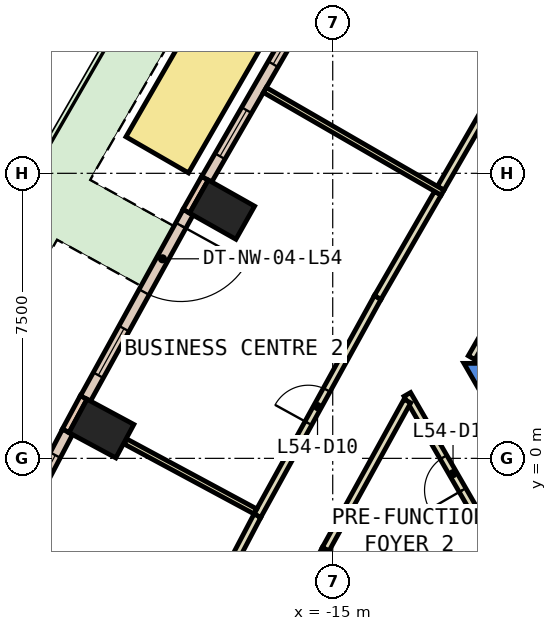
"""IFC4 building model, lengths in metres.
Left out: names, types, materials, properties, quantities, classifications, styles, units other than length and angle.
Written with IfcOpenShell. Run it as: python <this file> out.ifc"""

import sys

from ifc_helpers import new_model, si_unit, direction, frame, frame_2d, origin, origin_2d, place, context, subcontext, project, spatial, polyline, rectangle, outline, extrude, element, fill, save


model = new_model("IFC4")
c1 = context("Model", 3, precision=1e-05, world=origin(), true_north=direction((0.0, 1.0)))
c2 = subcontext(c1, "Body", "Model", "MODEL_VIEW")
j1 = project(units=[si_unit("LENGTHUNIT", "METRE"), si_unit("PLANEANGLEUNIT", "RADIAN")], contexts=[c1])
p1 = place(None, origin())
s1 = spatial("IfcSite", under=j1, at=p1, CompositionType="ELEMENT")
p2 = place(p1, origin())
s2 = spatial("IfcBuilding", under=s1, at=p2, CompositionType="ELEMENT")
p3 = place(p2, frame((0.0, 0.0, 241.4)))
s3 = spatial("IfcBuildingStorey", under=s2, at=p3, CompositionType="ELEMENT", Elevation=241.4)
for number, where, z_axis, x_axis in (
    (1, (-17.911, 6.544, 0.0), (0.0, 0.0, 1.0), (0.491, 0.871, 0.0)),
    (2, (-21.086, 0.784, 0.0), (0.0, 0.0, 1.0), (0.474, 0.881, 0.0)),
):
    element("IfcColumn", number, at=place(p3, frame(where, z_axis=z_axis, x_axis=x_axis)), inside=s3, PredefinedType="COLUMN", context=c2, shape_type="SweptSolid", body=[
        extrude(rectangle(XDim=1.0, YDim=1.4, at=origin_2d()), origin(), (0.0, 0.0, 1.0), 3.26),
    ])
p4 = place(p3, frame((0.0, 0.0, -0.6)))
e3 = element("IfcWall", 3, at=p4, inside=s3, PredefinedType="SHEAR", context=c2, shape_type="SweptSolid", body=[
    extrude(outline(polyline([(-11.547, 2.5), (-5.774, -7.5), (-5.427, -6.9), (-10.854, 2.5), (-11.547, 2.5)])), origin(), (0.0, 0.0, 1.0), 3.86),
])
for number, where, z_axis, x_axis in (
    (4, (-18.362, 7.372, 0.0), (0.0, 0.0, 1.0), (-0.492, -0.871, 0.0)),
    (5, (-21.553, 1.604, 0.0), (0.0, 0.0, 1.0), (-0.474, -0.881, 0.0)),
):
    element("IfcWall", number, at=place(p3, frame(where, z_axis=z_axis, x_axis=x_axis)), inside=s3, PredefinedType="STANDARD", context=c2, shape_type="SweptSolid", body=[
        extrude(rectangle(XDim=1.0, YDim=0.2, at=frame_2d((0.5, 0.0))), origin(), (0.0, 0.0, 1.0), 3.26),
    ])
p5 = place(p3, frame((-15.518, 12.189, 0.0), z_axis=(0.0, 0.0, 1.0), x_axis=(-0.49995037644, -0.866054052065, 0.0)))
e6 = element("IfcWall", 6, at=p5, inside=s3, PredefinedType="STANDARD", context=c2, shape_type="SweptSolid", body=[
    extrude(rectangle(XDim=5.594, YDim=0.3, at=frame_2d((2.797, 0.0))), origin(), (0.0, 0.0, 1.0), 3.26),
])
p6 = place(p5, frame((0.699, 0.0, 0.9)))
e7 = element("IfcOpeningElement", 7, at=p6, cuts=e6, PredefinedType="OPENING", context=c2, shape_type="SweptSolid", body=[
    extrude(rectangle(XDim=1.4, YDim=2.0, at=frame_2d((0.7, 1.0))), frame((0.0, 0.16, 0.0), z_axis=(0.0, -1.0, 0.0), x_axis=(1.0, 0.0, 0.0)), (0.0, 0.0, 1.0), 0.32),
])
p7 = place(p5, frame((3.496, 0.0, 0.9)))
e8 = element("IfcOpeningElement", 8, at=p7, cuts=e6, PredefinedType="OPENING", context=c2, shape_type="SweptSolid", body=[
    extrude(rectangle(XDim=1.4, YDim=2.0, at=frame_2d((0.7, 1.0))), frame((0.0, 0.16, 0.0), z_axis=(0.0, -1.0, 0.0), x_axis=(1.0, 0.0, 0.0)), (0.0, 0.0, 1.0), 0.32),
])
p8 = place(p3, frame((-18.805, 6.475, 0.0), z_axis=(0.0, 0.0, 1.0), x_axis=(-0.482734585173, -0.875766704253, 0.0)))
e9 = element("IfcWall", 9, at=p8, inside=s3, PredefinedType="STANDARD", context=c2, shape_type="SweptSolid", body=[
    extrude(rectangle(XDim=5.593, YDim=0.3, at=frame_2d((2.796, 0.0))), origin(), (0.0, 0.0, 1.0), 3.26),
])
p9 = place(p8, frame((0.398, 0.0, 0.0)))
e10 = element("IfcOpeningElement", 10, at=p9, cuts=e9, PredefinedType="OPENING", context=c2, shape_type="SweptSolid", body=[
    extrude(rectangle(XDim=2.0, YDim=2.4, at=frame_2d((1.0, 1.2))), frame((0.0, 0.16, 0.0), z_axis=(0.0, -1.0, 0.0), x_axis=(1.0, 0.0, 0.0)), (0.0, 0.0, 1.0), 0.32),
])
p10 = place(p8, frame((3.495, 0.0, 0.9)))
e11 = element("IfcOpeningElement", 11, at=p10, cuts=e9, PredefinedType="OPENING", context=c2, shape_type="SweptSolid", body=[
    extrude(rectangle(XDim=1.4, YDim=2.0, at=frame_2d((0.7, 1.0))), frame((0.0, 0.16, 0.0), z_axis=(0.0, -1.0, 0.0), x_axis=(1.0, 0.0, 0.0)), (0.0, 0.0, 1.0), 0.32),
])
p11 = place(p3, frame((-21.978, 0.698, 0.0), z_axis=(0.0, 0.0, 1.0), x_axis=(-0.465228032148, -0.885190871001, 0.0)))
e12 = element("IfcWall", 12, at=p11, inside=s3, PredefinedType="STANDARD", context=c2, shape_type="SweptSolid", body=[
    extrude(rectangle(XDim=5.572, YDim=0.3, at=frame_2d((2.786, 0.0))), origin(), (0.0, 0.0, 1.0), 3.26),
])
p12 = place(p11, frame((0.693, 0.0, 0.9)))
e13 = element("IfcOpeningElement", 13, at=p12, cuts=e12, PredefinedType="OPENING", context=c2, shape_type="SweptSolid", body=[
    extrude(rectangle(XDim=1.4, YDim=2.0, at=frame_2d((0.7, 1.0))), frame((0.0, 0.16, 0.0), z_axis=(0.0, -1.0, 0.0), x_axis=(1.0, 0.0, 0.0)), (0.0, 0.0, 1.0), 0.32),
])
p13 = place(p11, frame((3.479, 0.0, 0.9)))
e14 = element("IfcOpeningElement", 14, at=p13, cuts=e12, PredefinedType="OPENING", context=c2, shape_type="SweptSolid", body=[
    extrude(rectangle(XDim=1.4, YDim=2.0, at=frame_2d((0.7, 1.0))), frame((0.0, 0.16, 0.0), z_axis=(0.0, -1.0, 0.0), x_axis=(1.0, 0.0, 0.0)), (0.0, 0.0, 1.0), 0.32),
])
p14 = place(p3, frame((-16.725, 12.997, 0.0), z_axis=(0.0, 0.0, 1.0), x_axis=(-0.499964737226, -0.866045761799, 0.0)))
e15 = element("IfcWall", 15, at=p14, inside=s3, PredefinedType="STANDARD", context=c2, shape_type="SweptSolid", body=[
    extrude(rectangle(XDim=5.786, YDim=1.9, at=frame_2d((2.893, 0.0))), origin(), (0.0, 0.0, 1.0), 0.8),
])
p15 = place(p3, frame((-10.63, -2.488, 0.0), z_axis=(0.0, 0.0, 1.0), x_axis=(-0.500108649621, 0.865962665808, 0.0)))
e16 = element("IfcWall", 16, at=p15, inside=s3, PredefinedType="PARTITIONING", context=c2, shape_type="SweptSolid", body=[
    extrude(rectangle(XDim=4.815, YDim=0.2, at=frame_2d((2.408, 0.0))), origin(), (0.0, 0.0, 1.0), 3.26),
])
p16 = place(p15, frame((1.908, 0.0, 0.0)))
e17 = element("IfcOpeningElement", 17, at=p16, cuts=e16, PredefinedType="OPENING", context=c2, shape_type="SweptSolid", body=[
    extrude(rectangle(XDim=1.0, YDim=2.1, at=frame_2d((0.5, 1.05))), frame((0.0, 0.11, 0.0), z_axis=(0.0, -1.0, 0.0), x_axis=(1.0, 0.0, 0.0)), (0.0, 0.0, 1.0), 0.22),
])
p17 = place(p3, frame((-13.036, 1.508, 0.0), z_axis=(0.0, 0.0, 1.0), x_axis=(-0.482884552822, -0.87568402329, 0.0)))
e18 = element("IfcWall", 18, at=p17, inside=s3, PredefinedType="PARTITIONING", context=c2, shape_type="SweptSolid", body=[
    extrude(rectangle(XDim=4.453, YDim=0.2, at=frame_2d((2.226, 0.0))), origin(), (0.0, 0.0, 1.0), 3.26),
])
p18 = place(p3, frame((-15.186, -2.391, 0.0), z_axis=(0.0, 0.0, 1.0), x_axis=(-0.464794189951, -0.885418748948, 0.0)))
e19 = element("IfcWall", 19, at=p18, inside=s3, PredefinedType="PARTITIONING", context=c2, shape_type="SweptSolid", body=[
    extrude(rectangle(XDim=1.205, YDim=0.2, at=frame_2d((0.603, 0.0))), origin(), (0.0, 0.0, 1.0), 3.26),
])
p19 = place(p3, frame((-12.159, 7.107, 0.0), z_axis=(0.0, 0.0, 1.0), x_axis=(0.499953838557, 0.866052053466, 0.0)))
e20 = element("IfcWall", 20, at=p19, inside=s3, PredefinedType="PARTITIONING", context=c2, shape_type="SweptSolid", body=[
    extrude(rectangle(XDim=3.166, YDim=0.2, at=frame_2d((1.583, 0.0))), origin(), (0.0, 0.0, 1.0), 3.26),
])
p20 = place(p3, frame((-16.983, -1.509, 0.0), z_axis=(0.0, 0.0, 1.0), x_axis=(0.482785999899, 0.875738361785, 0.0)))
e21 = element("IfcWall", 21, at=p20, inside=s3, PredefinedType="PARTITIONING", context=c2, shape_type="SweptSolid", body=[
    extrude(rectangle(XDim=6.558, YDim=0.2, at=frame_2d((3.279, 0.0))), origin(), (0.0, 0.0, 1.0), 3.26),
])
p21 = place(p20, frame((2.779, 0.0, 0.0)))
e22 = element("IfcOpeningElement", 22, at=p21, cuts=e21, PredefinedType="OPENING", context=c2, shape_type="SweptSolid", body=[
    extrude(rectangle(XDim=1.0, YDim=2.1, at=frame_2d((0.5, 1.05))), frame((0.0, 0.11, 0.0), z_axis=(0.0, -1.0, 0.0), x_axis=(1.0, 0.0, 0.0)), (0.0, 0.0, 1.0), 0.22),
])
p22 = place(p3, frame((-13.817, 4.234, 0.0), z_axis=(0.0, 0.0, 1.0), x_axis=(0.499820325382, 0.866129114125, 0.0)))
e23 = element("IfcWall", 23, at=p22, inside=s3, PredefinedType="PARTITIONING", context=c2, shape_type="SweptSolid", body=[
    extrude(rectangle(XDim=3.167, YDim=0.2, at=frame_2d((1.583, 0.0))), origin(), (0.0, 0.0, 1.0), 3.26),
])
p23 = place(p3, frame((-19.696, -6.675, 0.0), z_axis=(0.0, 0.0, 1.0), x_axis=(0.465165163774, 0.88522390976, 0.0)))
e24 = element("IfcWall", 24, at=p23, inside=s3, PredefinedType="PARTITIONING", context=c2, shape_type="SweptSolid", body=[
    extrude(rectangle(XDim=5.835, YDim=0.2, at=frame_2d((2.917, 0.0))), origin(), (0.0, 0.0, 1.0), 3.26),
])
p24 = place(p23, frame((2.492, 0.0, 0.0)))
e25 = element("IfcOpeningElement", 25, at=p24, cuts=e24, PredefinedType="OPENING", context=c2, shape_type="SweptSolid", body=[
    extrude(rectangle(XDim=1.0, YDim=2.1, at=frame_2d((0.5, 1.05))), frame((0.0, 0.11, 0.0), z_axis=(0.0, -1.0, 0.0), x_axis=(1.0, 0.0, 0.0)), (0.0, 0.0, 1.0), 0.22),
])
p25 = place(p3, frame((-10.506, -2.503, 0.0), z_axis=(0.0, 0.0, 1.0), x_axis=(-0.866044872465, -0.49996627774, 0.0)))
e26 = element("IfcWall", 26, at=p25, inside=s3, PredefinedType="PARTITIONING", context=c2, shape_type="SweptSolid", body=[
    extrude(rectangle(XDim=5.2, YDim=0.15, at=frame_2d((2.6, 0.0))), origin(), (0.0, 0.0, 1.0), 3.26),
])
p26 = place(p3, frame((-12.11, 6.992, 0.0), z_axis=(0.0, 0.0, 1.0), x_axis=(-0.865994316829, 0.50005384032, 0.0)))
e27 = element("IfcWall", 27, at=p26, inside=s3, PredefinedType="PARTITIONING", context=c2, shape_type="SweptSolid", body=[
    extrude(rectangle(XDim=5.399, YDim=0.15, at=frame_2d((2.7, 0.0))), origin(), (0.0, 0.0, 1.0), 3.26),
])
p27 = place(p3, frame((-17.035, -1.396, 0.0), z_axis=(0.0, 0.0, 1.0), x_axis=(-0.88055795398, 0.473938487234, 0.0)))
e28 = element("IfcWall", 28, at=p27, inside=s3, PredefinedType="PARTITIONING", context=c2, shape_type="SweptSolid", body=[
    extrude(rectangle(XDim=3.88, YDim=0.15, at=frame_2d((1.94, 0.0))), origin(), (0.0, 0.0, 1.0), 3.26),
])
p28 = place(p3, frame((-10.449, 4.203, 0.0), z_axis=(0.0, 0.0, 1.0), x_axis=(-0.499914839587, -0.866074565589, 0.0)))
e29 = element("IfcWall", 29, at=p28, inside=s3, PredefinedType="PARTITIONING", context=c2, shape_type="SweptSolid", body=[
    extrude(rectangle(XDim=1.794, YDim=0.2, at=frame_2d((0.897, 0.0))), origin(), (0.0, 0.0, 1.0), 2.4),
])
p29 = place(p28, frame((0.397, 0.0, 0.0)))
e30 = element("IfcOpeningElement", 30, at=p29, cuts=e29, PredefinedType="OPENING", context=c2, shape_type="SweptSolid", body=[
    extrude(rectangle(XDim=1.0, YDim=2.1, at=frame_2d((0.5, 1.05))), frame((0.0, 0.11, 0.0), z_axis=(0.0, -1.0, 0.0), x_axis=(1.0, 0.0, 0.0)), (0.0, 0.0, 1.0), 0.22),
])
p30 = place(p6, origin())
e31 = element("IfcWindow", 31, at=p30, inside=s3, PartitioningType="SINGLE_PANEL", PredefinedType="WINDOW", context=c2, shape_type="SweptSolid", body=[
    extrude(rectangle(XDim=1.4, YDim=2.0, at=frame_2d((0.7, 1.0))), frame((0.0, 0.03, 0.0), z_axis=(0.0, -1.0, 0.0), x_axis=(1.0, 0.0, 0.0)), (0.0, 0.0, 1.0), 0.06),
])
fill(e7, e31)
p31 = place(p7, origin())
e32 = element("IfcWindow", 32, at=p31, inside=s3, PartitioningType="SINGLE_PANEL", PredefinedType="WINDOW", context=c2, shape_type="SweptSolid", body=[
    extrude(rectangle(XDim=1.4, YDim=2.0, at=frame_2d((0.7, 1.0))), frame((0.0, 0.03, 0.0), z_axis=(0.0, -1.0, 0.0), x_axis=(1.0, 0.0, 0.0)), (0.0, 0.0, 1.0), 0.06),
])
fill(e8, e32)
p32 = place(p9, origin())
e33 = element("IfcDoor", 33, at=p32, inside=s3, OperationType="SLIDING_TO_LEFT", PredefinedType="DOOR", context=c2, shape_type="SweptSolid", body=[
    extrude(rectangle(XDim=2.0, YDim=2.4, at=frame_2d((1.0, 1.2))), frame((0.0, 0.025, 0.0), z_axis=(0.0, -1.0, 0.0), x_axis=(1.0, 0.0, 0.0)), (0.0, 0.0, 1.0), 0.05),
])
fill(e10, e33)
p33 = place(p10, origin())
e34 = element("IfcWindow", 34, at=p33, inside=s3, PartitioningType="SINGLE_PANEL", PredefinedType="WINDOW", context=c2, shape_type="SweptSolid", body=[
    extrude(rectangle(XDim=1.4, YDim=2.0, at=frame_2d((0.7, 1.0))), frame((0.0, 0.03, 0.0), z_axis=(0.0, -1.0, 0.0), x_axis=(1.0, 0.0, 0.0)), (0.0, 0.0, 1.0), 0.06),
])
fill(e11, e34)
p34 = place(p12, origin())
e35 = element("IfcWindow", 35, at=p34, inside=s3, PartitioningType="SINGLE_PANEL", PredefinedType="WINDOW", context=c2, shape_type="SweptSolid", body=[
    extrude(rectangle(XDim=1.4, YDim=2.0, at=frame_2d((0.7, 1.0))), frame((0.0, 0.03, 0.0), z_axis=(0.0, -1.0, 0.0), x_axis=(1.0, 0.0, 0.0)), (0.0, 0.0, 1.0), 0.06),
])
fill(e13, e35)
p35 = place(p21, origin())
e36 = element("IfcDoor", 36, at=p35, inside=s3, OperationType="SINGLE_SWING_LEFT", PredefinedType="DOOR", context=c2, shape_type="SweptSolid", body=[
    extrude(rectangle(XDim=1.0, YDim=2.1, at=frame_2d((0.5, 1.05))), frame((0.0, 0.025, 0.0), z_axis=(0.0, -1.0, 0.0), x_axis=(1.0, 0.0, 0.0)), (0.0, 0.0, 1.0), 0.05),
])
fill(e22, e36)
p36 = place(p16, origin())
e37 = element("IfcDoor", 37, at=p36, inside=s3, OperationType="SINGLE_SWING_LEFT", PredefinedType="DOOR", context=c2, shape_type="SweptSolid", body=[
    extrude(rectangle(XDim=1.0, YDim=2.1, at=frame_2d((0.5, 1.05))), frame((0.0, 0.025, 0.0), z_axis=(0.0, -1.0, 0.0), x_axis=(1.0, 0.0, 0.0)), (0.0, 0.0, 1.0), 0.05),
])
fill(e17, e37)
save(model, sys.argv[1])
